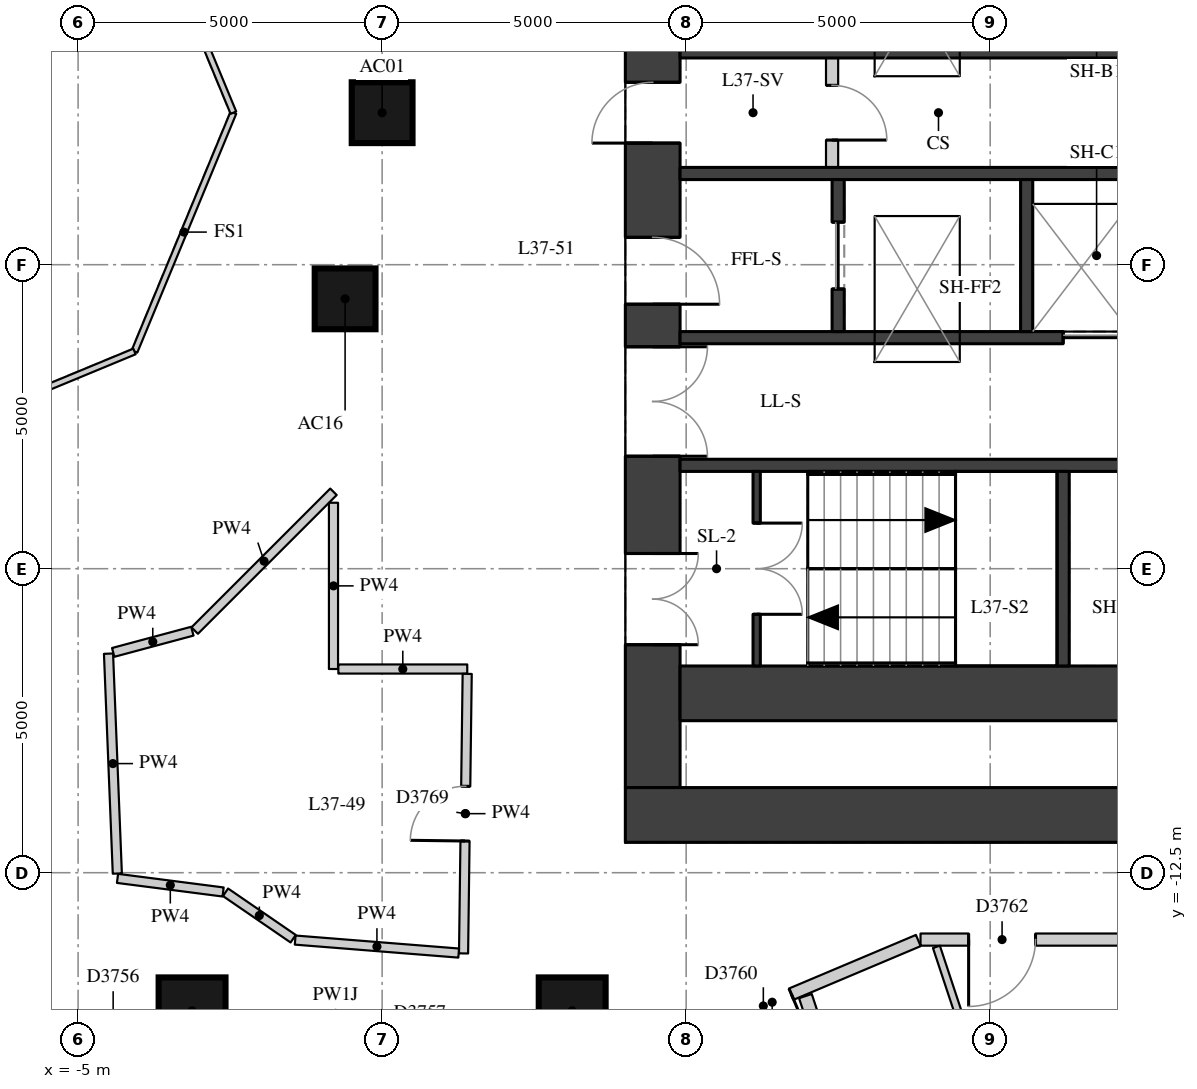
"""IFC4 building model, lengths in metres.
Left out: names, types, materials, properties, quantities, classifications, styles, units other than length and angle.
Written with IfcOpenShell. Run it as: python <this file> out.ifc"""

import sys

from ifc_helpers import new_model, si_unit, direction, frame, frame_2d, origin, origin_2d, place, context, subcontext, project, spatial, rectangle, extrude, element, fill, save


model = new_model("IFC4")
c1 = context("Model", 3, precision=1e-05, world=origin(), true_north=direction((0.0, 1.0)))
c2 = subcontext(c1, "Body", "Model", "MODEL_VIEW")
j1 = project(units=[si_unit("LENGTHUNIT", "METRE"), si_unit("PLANEANGLEUNIT", "RADIAN")], contexts=[c1])
p1 = place(None, origin())
s1 = spatial("IfcSite", under=j1, at=p1, CompositionType="ELEMENT")
p2 = place(p1, origin())
s2 = spatial("IfcBuilding", under=s1, at=p2, CompositionType="ELEMENT")
p3 = place(p2, frame((0.0, 0.0, 131.8)))
s3 = spatial("IfcBuildingStorey", under=s2, at=p3, CompositionType="ELEMENT", Elevation=131.8)
for number, where, z_axis, x_axis in (
    (1, (0.0, 0.0, 0.0), (0.0, 0.0, 1.0), (1.0, 0.0, 0.0)),
    (2, (-0.609, -3.062, 0.0), (0.0, 0.0, 1.0), (1.0, 0.0, 0.0)),
):
    element("IfcColumn", number, at=place(p3, frame(where, z_axis=z_axis, x_axis=x_axis)), inside=s3, PredefinedType="COLUMN", context=c2, shape_type="SweptSolid", body=[
        extrude(rectangle(XDim=1.0, YDim=1.0, at=origin_2d()), origin(), (0.0, 0.0, 1.0), 3.3),
    ])
for number, where, z_axis, x_axis in (
    (3, (-3.126, -14.772, 0.0), (0.0, 0.0, 1.0), (1.0, 0.0, 0.0)),
    (4, (3.126, -14.772, 0.0), (0.0, 0.0, 1.0), (1.0, 0.0, 0.0)),
):
    element("IfcColumn", number, at=place(p3, frame(where, z_axis=z_axis, x_axis=x_axis)), inside=s3, PredefinedType="COLUMN", context=c2, shape_type="SweptSolid", body=[
        extrude(rectangle(XDim=1.1, YDim=1.1, at=origin_2d()), origin(), (0.0, 0.0, 1.0), 3.3),
    ])
p4 = place(p3, frame((4.45, -11.1, 0.0), z_axis=(0.0, 0.0, 1.0), x_axis=(0.0, 1.0, 0.0)))
e5 = element("IfcWall", 5, at=p4, inside=s3, PredefinedType="SHEAR", context=c2, shape_type="SweptSolid", body=[
    extrude(rectangle(XDim=22.2, YDim=0.9, at=frame_2d((11.1, 0.0))), origin(), (0.0, 0.0, 1.0), 2.85),
])
p5 = place(p4, frame((2.35, 0.0, 0.0)))
e6 = element("IfcOpeningElement", 6, at=p5, cuts=e5, PredefinedType="OPENING", context=c2, shape_type="SweptSolid", body=[
    extrude(rectangle(XDim=1.5, YDim=2.1, at=frame_2d((0.75, 1.05))), frame((0.0, 0.46, 0.0), z_axis=(0.0, -1.0, 0.0), x_axis=(1.0, 0.0, 0.0)), (0.0, 0.0, 1.0), 0.92),
])
p6 = place(p4, frame((5.45, 0.0, 0.0)))
e7 = element("IfcOpeningElement", 7, at=p6, cuts=e5, PredefinedType="OPENING", context=c2, shape_type="SweptSolid", body=[
    extrude(rectangle(XDim=1.8, YDim=2.1, at=frame_2d((0.9, 1.05))), frame((0.0, 0.46, 0.0), z_axis=(0.0, -1.0, 0.0), x_axis=(1.0, 0.0, 0.0)), (0.0, 0.0, 1.0), 0.92),
])
p7 = place(p4, frame((7.95, 0.0, 0.0)))
e8 = element("IfcOpeningElement", 8, at=p7, cuts=e5, PredefinedType="OPENING", context=c2, shape_type="SweptSolid", body=[
    extrude(rectangle(XDim=1.1, YDim=2.1, at=frame_2d((0.55, 1.05))), frame((0.0, 0.46, 0.0), z_axis=(0.0, -1.0, 0.0), x_axis=(1.0, 0.0, 0.0)), (0.0, 0.0, 1.0), 0.92),
])
p8 = place(p4, frame((10.6, 0.0, 0.0)))
e9 = element("IfcOpeningElement", 9, at=p8, cuts=e5, PredefinedType="OPENING", context=c2, shape_type="SweptSolid", body=[
    extrude(rectangle(XDim=1.0, YDim=2.1, at=frame_2d((0.5, 1.05))), frame((0.0, 0.46, 0.0), z_axis=(0.0, -1.0, 0.0), x_axis=(1.0, 0.0, 0.0)), (0.0, 0.0, 1.0), 0.92),
])
p9 = place(p4, frame((13.15, 0.0, 0.0)))
e10 = element("IfcOpeningElement", 10, at=p9, cuts=e5, PredefinedType="OPENING", context=c2, shape_type="SweptSolid", body=[
    extrude(rectangle(XDim=1.1, YDim=2.1, at=frame_2d((0.55, 1.05))), frame((0.0, 0.46, 0.0), z_axis=(0.0, -1.0, 0.0), x_axis=(1.0, 0.0, 0.0)), (0.0, 0.0, 1.0), 0.92),
])
p10 = place(p4, frame((14.95, 0.0, 0.0)))
e11 = element("IfcOpeningElement", 11, at=p10, cuts=e5, PredefinedType="OPENING", context=c2, shape_type="SweptSolid", body=[
    extrude(rectangle(XDim=1.8, YDim=2.1, at=frame_2d((0.9, 1.05))), frame((0.0, 0.46, 0.0), z_axis=(0.0, -1.0, 0.0), x_axis=(1.0, 0.0, 0.0)), (0.0, 0.0, 1.0), 0.92),
])
p11 = place(p4, frame((18.35, 0.0, 0.0)))
e12 = element("IfcOpeningElement", 12, at=p11, cuts=e5, PredefinedType="OPENING", context=c2, shape_type="SweptSolid", body=[
    extrude(rectangle(XDim=1.5, YDim=2.1, at=frame_2d((0.75, 1.05))), frame((0.0, 0.46, 0.0), z_axis=(0.0, -1.0, 0.0), x_axis=(1.0, 0.0, 0.0)), (0.0, 0.0, 1.0), 0.92),
])
p12 = place(p3, frame((4.0, -11.55, 0.0), z_axis=(0.0, 0.0, 1.0), x_axis=(1.0, 0.0, 0.0)))
e13 = element("IfcWall", 13, at=p12, inside=s3, PredefinedType="SHEAR", context=c2, shape_type="SweptSolid", body=[
    extrude(rectangle(XDim=15.2, YDim=0.9, at=frame_2d((7.6, 0.0))), origin(), (0.0, 0.0, 1.0), 2.85),
])
p13 = place(p3, frame((4.9, -9.55, 0.0), z_axis=(0.0, 0.0, 1.0), x_axis=(1.0, 0.0, 0.0)))
e14 = element("IfcWall", 14, at=p13, inside=s3, PredefinedType="SHEAR", context=c2, shape_type="SweptSolid", body=[
    extrude(rectangle(XDim=10.2, YDim=0.9, at=frame_2d((5.1, 0.0))), origin(), (0.0, 0.0, 1.0), 2.85),
])
for number, where, z_axis, x_axis in (
    (15, (4.9, 1.0, 0.0), (0.0, 0.0, 1.0), (1.0, 0.0, 0.0)),
    (16, (4.9, -1.0, 0.0), (0.0, 0.0, 1.0), (1.0, 0.0, 0.0)),
):
    element("IfcWall", number, at=place(p3, frame(where, z_axis=z_axis, x_axis=x_axis)), inside=s3, PredefinedType="SHEAR", context=c2, shape_type="SweptSolid", body=[
        extrude(rectangle(XDim=10.2, YDim=0.2, at=frame_2d((5.1, 0.0))), origin(), (0.0, 0.0, 1.0), 2.85),
    ])
p14 = place(p3, frame((4.9, -3.7, 0.0), z_axis=(0.0, 0.0, 1.0), x_axis=(1.0, 0.0, 0.0)))
e17 = element("IfcWall", 17, at=p14, inside=s3, PredefinedType="SHEAR", context=c2, shape_type="SweptSolid", body=[
    extrude(rectangle(XDim=10.2, YDim=0.2, at=frame_2d((5.1, 0.0))), origin(), (0.0, 0.0, 1.0), 2.85),
])
p15 = place(p14, frame((6.3, 0.0, 0.0)))
e18 = element("IfcOpeningElement", 18, at=p15, cuts=e17, PredefinedType="OPENING", context=c2, shape_type="SweptSolid", body=[
    extrude(rectangle(XDim=1.1, YDim=2.1, at=frame_2d((0.55, 1.05))), frame((0.0, 0.11, 0.0), z_axis=(0.0, -1.0, 0.0), x_axis=(1.0, 0.0, 0.0)), (0.0, 0.0, 1.0), 0.22),
])
p16 = place(p14, frame((8.6, 0.0, 0.0)))
e19 = element("IfcOpeningElement", 19, at=p16, cuts=e17, PredefinedType="OPENING", context=c2, shape_type="SweptSolid", body=[
    extrude(rectangle(XDim=1.1, YDim=2.1, at=frame_2d((0.55, 1.05))), frame((0.0, 0.11, 0.0), z_axis=(0.0, -1.0, 0.0), x_axis=(1.0, 0.0, 0.0)), (0.0, 0.0, 1.0), 0.22),
])
p17 = place(p3, frame((4.9, -5.8, 0.0), z_axis=(0.0, 0.0, 1.0), x_axis=(1.0, 0.0, 0.0)))
e20 = element("IfcWall", 20, at=p17, inside=s3, PredefinedType="SHEAR", context=c2, shape_type="SweptSolid", body=[
    extrude(rectangle(XDim=10.2, YDim=0.2, at=frame_2d((5.1, 0.0))), origin(), (0.0, 0.0, 1.0), 2.85),
])
p18 = place(p3, frame((11.2, -9.1, 0.0), z_axis=(0.0, 0.0, 1.0), x_axis=(0.0, 1.0, 0.0)))
e21 = element("IfcWall", 21, at=p18, inside=s3, PredefinedType="SHEAR", context=c2, shape_type="SweptSolid", body=[
    extrude(rectangle(XDim=3.2, YDim=0.2, at=frame_2d((1.6, 0.0))), origin(), (0.0, 0.0, 1.0), 2.85),
])
p19 = place(p3, frame((7.5, -3.6, 0.0), z_axis=(0.0, 0.0, 1.0), x_axis=(0.0, 1.0, 0.0)))
e22 = element("IfcWall", 22, at=p19, inside=s3, PredefinedType="SHEAR", context=c2, shape_type="SweptSolid", body=[
    extrude(rectangle(XDim=2.5, YDim=0.2, at=frame_2d((1.25, 0.0))), origin(), (0.0, 0.0, 1.0), 2.85),
])
p20 = place(p19, frame((0.7, 0.0, 0.0)))
e23 = element("IfcOpeningElement", 23, at=p20, cuts=e22, PredefinedType="OPENING", context=c2, shape_type="SweptSolid", body=[
    extrude(rectangle(XDim=1.1, YDim=2.1, at=frame_2d((0.55, 1.05))), frame((0.0, 0.11, 0.0), z_axis=(0.0, -1.0, 0.0), x_axis=(1.0, 0.0, 0.0)), (0.0, 0.0, 1.0), 0.22),
])
p21 = place(p3, frame((10.6, -3.6, 0.0), z_axis=(0.0, 0.0, 1.0), x_axis=(0.0, 1.0, 0.0)))
e24 = element("IfcWall", 24, at=p21, inside=s3, PredefinedType="SHEAR", context=c2, shape_type="SweptSolid", body=[
    extrude(rectangle(XDim=2.5, YDim=0.2, at=frame_2d((1.25, 0.0))), origin(), (0.0, 0.0, 1.0), 2.85),
])
p22 = place(p3, frame((6.16, -9.1, 0.0), z_axis=(0.0, 0.0, 1.0), x_axis=(0.0, 1.0, 0.0)))
e25 = element("IfcWall", 25, at=p22, inside=s3, PredefinedType="SHEAR", context=c2, shape_type="SweptSolid", body=[
    extrude(rectangle(XDim=3.2, YDim=0.12, at=frame_2d((1.6, 0.0))), origin(), (0.0, 0.0, 1.0), 2.85),
])
p23 = place(p22, frame((0.85, 0.0, 0.0)))
e26 = element("IfcOpeningElement", 26, at=p23, cuts=e25, PredefinedType="OPENING", context=c2, shape_type="SweptSolid", body=[
    extrude(rectangle(XDim=1.5, YDim=2.1, at=frame_2d((0.75, 1.05))), frame((0.0, 0.07, 0.0), z_axis=(0.0, -1.0, 0.0), x_axis=(1.0, 0.0, 0.0)), (0.0, 0.0, 1.0), 0.14),
])
p24 = place(p3, frame((7.4, -0.9, 0.0), z_axis=(0.0, 0.0, 1.0), x_axis=(0.0, 1.0, 0.0)))
e27 = element("IfcWall", 27, at=p24, inside=s3, PredefinedType="PARTITIONING", context=c2, shape_type="SweptSolid", body=[
    extrude(rectangle(XDim=1.8, YDim=0.2, at=frame_2d((0.9, 0.0))), origin(), (0.0, 0.0, 1.0), 2.85),
])
p25 = place(p24, frame((0.45, 0.0, 0.0)))
e28 = element("IfcOpeningElement", 28, at=p25, cuts=e27, PredefinedType="OPENING", context=c2, shape_type="SweptSolid", body=[
    extrude(rectangle(XDim=0.9, YDim=2.1, at=frame_2d((0.45, 1.05))), frame((0.0, 0.11, 0.0), z_axis=(0.0, -1.0, 0.0), x_axis=(1.0, 0.0, 0.0)), (0.0, 0.0, 1.0), 0.22),
])
p26 = place(p3, frame((20.7, -13.6, 0.0), z_axis=(0.0, 0.0, 1.0), x_axis=(-1.0, 0.0, 0.0)))
e29 = element("IfcWall", 29, at=p26, inside=s3, PredefinedType="PARTITIONING", context=c2, shape_type="SweptSolid", body=[
    extrude(rectangle(XDim=11.845, YDim=0.2, at=frame_2d((5.923, 0.0))), origin(), (0.0, 0.0, 1.0), 2.85),
])
p27 = place(p26, frame((9.954, 0.0, 0.0)))
e30 = element("IfcOpeningElement", 30, at=p27, cuts=e29, PredefinedType="OPENING", context=c2, shape_type="SweptSolid", body=[
    extrude(rectangle(XDim=1.1, YDim=2.1, at=frame_2d((0.55, 1.05))), frame((0.0, 0.11, 0.0), z_axis=(0.0, -1.0, 0.0), x_axis=(1.0, 0.0, 0.0)), (0.0, 0.0, 1.0), 0.22),
])
p28 = place(p3, frame((8.818, -13.616, 0.0), z_axis=(0.0, 0.0, 1.0), x_axis=(-0.921304705085, -0.388841407759, 0.0)))
e31 = element("IfcWall", 31, at=p28, inside=s3, PredefinedType="PARTITIONING", context=c2, shape_type="SweptSolid", body=[
    extrude(rectangle(XDim=5.217, YDim=0.2, at=frame_2d((2.608, 0.0))), origin(), (0.0, 0.0, 1.0), 2.85),
])
p29 = place(p28, frame((2.266, 0.0, 0.0)))
e32 = element("IfcOpeningElement", 32, at=p29, cuts=e31, PredefinedType="OPENING", context=c2, shape_type="SweptSolid", body=[
    extrude(rectangle(XDim=1.0, YDim=2.1, at=frame_2d((0.5, 1.05))), frame((0.0, 0.11, 0.0), z_axis=(0.0, -1.0, 0.0), x_axis=(1.0, 0.0, 0.0)), (0.0, 0.0, 1.0), 0.22),
])
p30 = place(p3, frame((-3.083, -8.518, 0.0), z_axis=(0.0, 0.0, 1.0), x_axis=(0.707106781187, 0.707106781187, 0.0)))
e33 = element("IfcWall", 33, at=p30, inside=s3, PredefinedType="PARTITIONING", context=c2, shape_type="SweptSolid", body=[
    extrude(rectangle(XDim=3.228, YDim=0.15, at=frame_2d((1.614, 0.0))), origin(), (0.0, 0.0, 1.0), 2.85),
])
p31 = place(p3, frame((-0.8, -6.415, 0.0), z_axis=(0.0, 0.0, 1.0), x_axis=(0.0, -1.0, 0.0)))
e34 = element("IfcWall", 34, at=p31, inside=s3, PredefinedType="PARTITIONING", context=c2, shape_type="SweptSolid", body=[
    extrude(rectangle(XDim=2.735, YDim=0.15, at=frame_2d((1.367, 0.0))), origin(), (0.0, 0.0, 1.0), 2.85),
])
p32 = place(p3, frame((-0.72, -9.15, 0.0), z_axis=(0.0, 0.0, 1.0), x_axis=(1.0, 0.0, 0.0)))
e35 = element("IfcWall", 35, at=p32, inside=s3, PredefinedType="PARTITIONING", context=c2, shape_type="SweptSolid", body=[
    extrude(rectangle(XDim=2.12, YDim=0.15, at=frame_2d((1.06, 0.0))), origin(), (0.0, 0.0, 1.0), 2.85),
])
p33 = place(p3, frame((1.399, -9.23, 0.0), z_axis=(0.0, 0.0, 1.0), x_axis=(-0.013008669764, -0.999915383676, 0.0)))
e36 = element("IfcWall", 36, at=p33, inside=s3, PredefinedType="PARTITIONING", context=c2, shape_type="SweptSolid", body=[
    extrude(rectangle(XDim=4.598, YDim=0.15, at=frame_2d((2.299, 0.0))), origin(), (0.0, 0.0, 1.0), 2.85),
])
p34 = place(p33, frame((1.849, 0.0, 0.0)))
e37 = element("IfcOpeningElement", 37, at=p34, cuts=e36, PredefinedType="OPENING", context=c2, shape_type="SweptSolid", body=[
    extrude(rectangle(XDim=0.9, YDim=2.1, at=frame_2d((0.45, 1.05))), frame((0.0, 0.085, 0.0), z_axis=(0.0, -1.0, 0.0), x_axis=(1.0, 0.0, 0.0)), (0.0, 0.0, 1.0), 0.17),
])
p35 = place(p3, frame((1.259, -13.822, 0.0), z_axis=(0.0, 0.0, 1.0), x_axis=(-0.996859157686, 0.079194821407, 0.0)))
e38 = element("IfcWall", 38, at=p35, inside=s3, PredefinedType="PARTITIONING", context=c2, shape_type="SweptSolid", body=[
    extrude(rectangle(XDim=2.698, YDim=0.15, at=frame_2d((1.349, 0.0))), origin(), (0.0, 0.0, 1.0), 2.85),
])
p36 = place(p3, frame((-1.463, -13.586, 0.0), z_axis=(0.0, 0.0, 1.0), x_axis=(-0.82445873192, 0.565922078878, 0.0)))
e39 = element("IfcWall", 39, at=p36, inside=s3, PredefinedType="PARTITIONING", context=c2, shape_type="SweptSolid", body=[
    extrude(rectangle(XDim=1.349, YDim=0.15, at=frame_2d((0.675, 0.0))), origin(), (0.0, 0.0, 1.0), 2.85),
])
p37 = place(p3, frame((-2.615, -12.817, 0.0), z_axis=(0.0, 0.0, 1.0), x_axis=(-0.991812078881, 0.127705912884, 0.0)))
e40 = element("IfcWall", 40, at=p37, inside=s3, PredefinedType="PARTITIONING", context=c2, shape_type="SweptSolid", body=[
    extrude(rectangle(XDim=1.751, YDim=0.15, at=frame_2d((0.875, 0.0))), origin(), (0.0, 0.0, 1.0), 2.85),
])
p38 = place(p3, frame((-4.355, -12.513, 0.0), z_axis=(0.0, 0.0, 1.0), x_axis=(-0.040070411422, 0.999196858546, 0.0)))
e41 = element("IfcWall", 41, at=p38, inside=s3, PredefinedType="PARTITIONING", context=c2, shape_type="SweptSolid", body=[
    extrude(rectangle(XDim=3.619, YDim=0.15, at=frame_2d((1.81, 0.0))), origin(), (0.0, 0.0, 1.0), 2.85),
])
p39 = place(p3, frame((-4.423, -8.877, 0.0), z_axis=(0.0, 0.0, 1.0), x_axis=(0.965912469164, 0.258868889429, 0.0)))
e42 = element("IfcWall", 42, at=p39, inside=s3, PredefinedType="PARTITIONING", context=c2, shape_type="SweptSolid", body=[
    extrude(rectangle(XDim=1.348, YDim=0.15, at=frame_2d((0.674, 0.0))), origin(), (0.0, 0.0, 1.0), 2.85),
])
p40 = place(p3, frame((9.474, -22.112, 0.0), z_axis=(0.0, 0.0, 1.0), x_axis=(-0.314540101072, 0.949244186086, 0.0)))
e43 = element("IfcWall", 43, at=p40, inside=s3, PredefinedType="PARTITIONING", context=c2, shape_type="SweptSolid", body=[
    extrude(rectangle(XDim=7.988, YDim=0.22, at=frame_2d((3.994, 0.0))), origin(), (0.0, 0.0, 1.0), 2.85),
])
p41 = place(p3, frame((9.116, -13.719, 0.0), z_axis=(0.0, 0.0, 1.0), x_axis=(0.314476938086, -0.949265113344, 0.0)))
e44 = element("IfcWall", 44, at=p41, inside=s3, PredefinedType="PARTITIONING", context=c2, shape_type="SweptSolid", body=[
    extrude(rectangle(XDim=2.971, YDim=0.12, at=frame_2d((1.485, 0.0))), origin(), (0.0, 0.0, 1.0), 2.85),
])
for number, where, z_axis, x_axis in (
    (45, (-2.446, 0.0, 0.0), (0.0, 0.0, 1.0), (-0.383, -0.924, 0.0)),
    (46, (-4.073, -3.927, 0.0), (0.0, 0.0, 1.0), (-0.924, -0.383, 0.0)),
    (47, (-4.073, 3.927, 0.0), (0.0, 0.0, 1.0), (0.383, -0.924, 0.0)),
):
    element("IfcWall", number, at=place(p3, frame(where, z_axis=z_axis, x_axis=x_axis)), inside=s3, PredefinedType="PARTITIONING", context=c2, shape_type="SweptSolid", body=[
        extrude(rectangle(XDim=4.251, YDim=0.1, at=frame_2d((2.125, 0.0))), origin(), (0.0, 0.0, 1.0), 2.85),
    ])
p42 = place(p5, origin())
e48 = element("IfcDoor", 48, at=p42, inside=s3, OperationType="DOUBLE_DOOR_SINGLE_SWING", PredefinedType="DOOR", context=c2, shape_type="SweptSolid", body=[
    extrude(rectangle(XDim=1.5, YDim=2.1, at=frame_2d((0.75, 1.05))), frame((0.0, 0.025, 0.0), z_axis=(0.0, -1.0, 0.0), x_axis=(1.0, 0.0, 0.0)), (0.0, 0.0, 1.0), 0.05),
])
fill(e6, e48)
p43 = place(p6, origin())
e49 = element("IfcDoor", 49, at=p43, inside=s3, OperationType="DOUBLE_DOOR_SINGLE_SWING", PredefinedType="DOOR", context=c2, shape_type="SweptSolid", body=[
    extrude(rectangle(XDim=1.8, YDim=2.1, at=frame_2d((0.9, 1.05))), frame((0.0, 0.025, 0.0), z_axis=(0.0, -1.0, 0.0), x_axis=(1.0, 0.0, 0.0)), (0.0, 0.0, 1.0), 0.05),
])
fill(e7, e49)
p44 = place(p7, origin())
e50 = element("IfcDoor", 50, at=p44, inside=s3, OperationType="SINGLE_SWING_RIGHT", PredefinedType="DOOR", context=c2, shape_type="SweptSolid", body=[
    extrude(rectangle(XDim=1.1, YDim=2.1, at=frame_2d((0.55, 1.05))), frame((0.0, 0.025, 0.0), z_axis=(0.0, -1.0, 0.0), x_axis=(1.0, 0.0, 0.0)), (0.0, 0.0, 1.0), 0.05),
])
fill(e8, e50)
p45 = place(p8, origin())
e51 = element("IfcDoor", 51, at=p45, inside=s3, OperationType="SINGLE_SWING_LEFT", PredefinedType="DOOR", context=c2, shape_type="SweptSolid", body=[
    extrude(rectangle(XDim=1.0, YDim=2.1, at=frame_2d((0.5, 1.05))), frame((0.0, 0.025, 0.0), z_axis=(0.0, -1.0, 0.0), x_axis=(1.0, 0.0, 0.0)), (0.0, 0.0, 1.0), 0.05),
])
fill(e9, e51)
p46 = place(p23, origin())
e52 = element("IfcDoor", 52, at=p46, inside=s3, OperationType="DOUBLE_DOOR_SINGLE_SWING", PredefinedType="DOOR", context=c2, shape_type="SweptSolid", body=[
    extrude(rectangle(XDim=1.5, YDim=2.1, at=frame_2d((0.75, 1.05))), frame((0.0, 0.025, 0.0), z_axis=(0.0, -1.0, 0.0), x_axis=(1.0, 0.0, 0.0)), (0.0, 0.0, 1.0), 0.05),
])
fill(e26, e52)
p47 = place(p15, origin())
e53 = element("IfcDoor", 53, at=p47, inside=s3, OperationType="DOUBLE_DOOR_SLIDING", PredefinedType="DOOR", context=c2, shape_type="SweptSolid", body=[
    extrude(rectangle(XDim=1.1, YDim=2.1, at=frame_2d((0.55, 1.05))), frame((0.0, 0.025, 0.0), z_axis=(0.0, -1.0, 0.0), x_axis=(1.0, 0.0, 0.0)), (0.0, 0.0, 1.0), 0.05),
])
fill(e18, e53)
p48 = place(p20, origin())
e54 = element("IfcDoor", 54, at=p48, inside=s3, OperationType="DOUBLE_DOOR_SLIDING", PredefinedType="DOOR", context=c2, shape_type="SweptSolid", body=[
    extrude(rectangle(XDim=1.1, YDim=2.1, at=frame_2d((0.55, 1.05))), frame((0.0, 0.025, 0.0), z_axis=(0.0, -1.0, 0.0), x_axis=(1.0, 0.0, 0.0)), (0.0, 0.0, 1.0), 0.05),
])
fill(e23, e54)
p49 = place(p25, origin())
e55 = element("IfcDoor", 55, at=p49, inside=s3, OperationType="SINGLE_SWING_RIGHT", PredefinedType="DOOR", context=c2, shape_type="SweptSolid", body=[
    extrude(rectangle(XDim=0.9, YDim=2.1, at=frame_2d((0.45, 1.05))), frame((0.0, 0.025, 0.0), z_axis=(0.0, -1.0, 0.0), x_axis=(1.0, 0.0, 0.0)), (0.0, 0.0, 1.0), 0.05),
])
fill(e28, e55)
p50 = place(p29, origin())
e56 = element("IfcDoor", 56, at=p50, inside=s3, OperationType="SINGLE_SWING_LEFT", PredefinedType="DOOR", context=c2, shape_type="SweptSolid", body=[
    extrude(rectangle(XDim=1.0, YDim=2.1, at=frame_2d((0.5, 1.05))), frame((0.0, 0.025, 0.0), z_axis=(0.0, -1.0, 0.0), x_axis=(1.0, 0.0, 0.0)), (0.0, 0.0, 1.0), 0.05),
])
fill(e32, e56)
p51 = place(p27, origin())
e57 = element("IfcDoor", 57, at=p51, inside=s3, OperationType="SINGLE_SWING_RIGHT", PredefinedType="DOOR", context=c2, shape_type="SweptSolid", body=[
    extrude(rectangle(XDim=1.1, YDim=2.1, at=frame_2d((0.55, 1.05))), frame((0.0, 0.025, 0.0), z_axis=(0.0, -1.0, 0.0), x_axis=(1.0, 0.0, 0.0)), (0.0, 0.0, 1.0), 0.05),
])
fill(e30, e57)
p52 = place(p34, origin())
e58 = element("IfcDoor", 58, at=p52, inside=s3, OperationType="SINGLE_SWING_LEFT", PredefinedType="DOOR", context=c2, shape_type="SweptSolid", body=[
    extrude(rectangle(XDim=0.9, YDim=2.1, at=frame_2d((0.45, 1.05))), frame((0.0, 0.025, 0.0), z_axis=(0.0, -1.0, 0.0), x_axis=(1.0, 0.0, 0.0)), (0.0, 0.0, 1.0), 0.05),
])
fill(e37, e58)
save(model, sys.argv[1])
